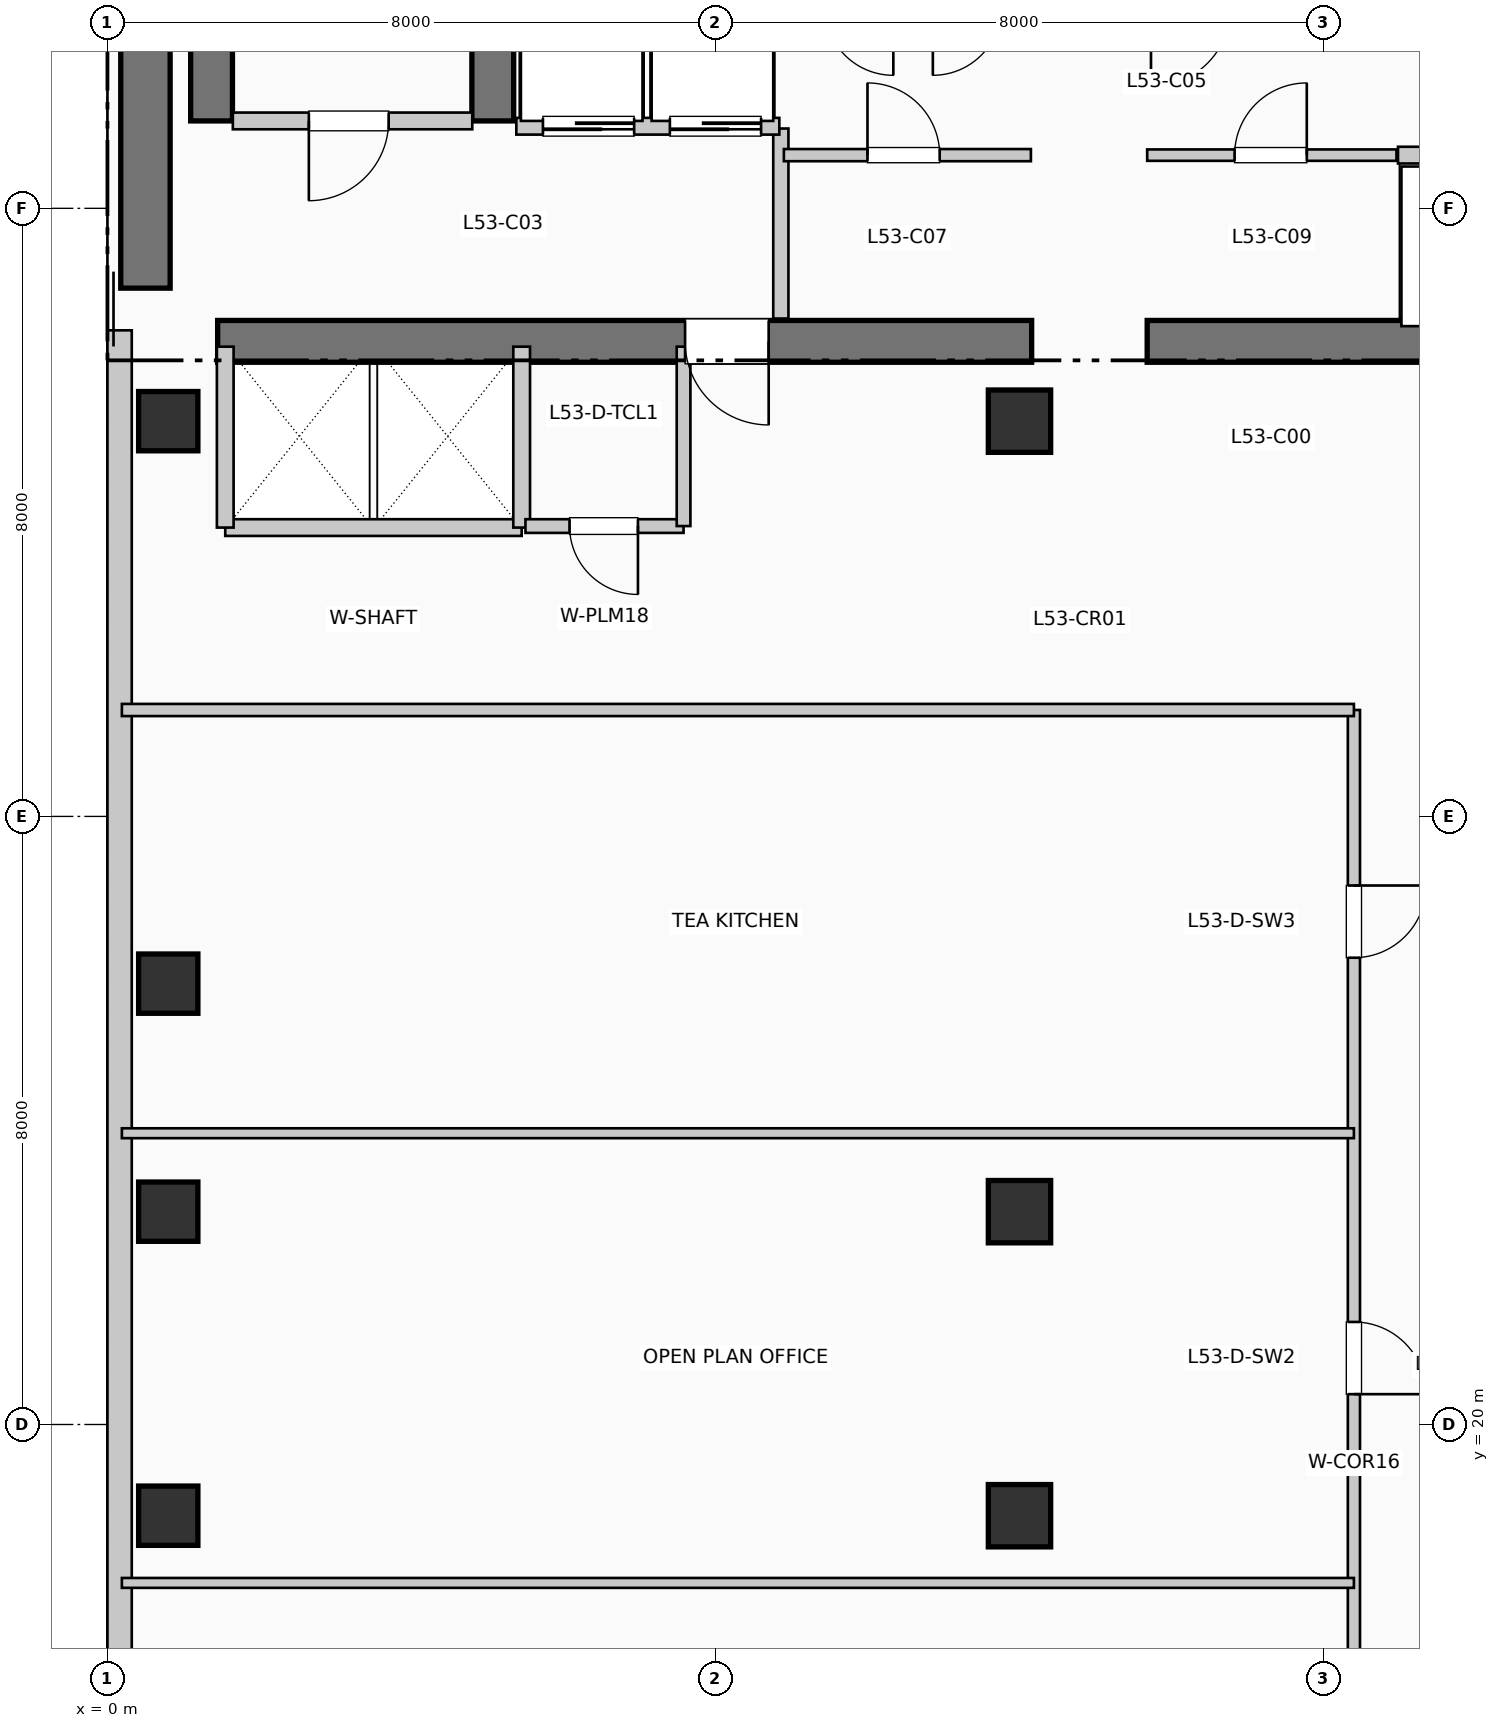
"""IFC4 building model, lengths in metres.
Left out: names, types, materials, properties, quantities, classifications, styles, units other than length and angle.
Written with IfcOpenShell. Run it as: python <this file> out.ifc"""

import sys

from ifc_helpers import new_model, si_unit, direction, frame, frame_2d, origin, origin_2d, place, context, subcontext, project, spatial, rectangle, extrude, element, fill, save


model = new_model("IFC4")
c1 = context("Model", 3, precision=1e-05, world=origin(), true_north=direction((0.0, 1.0)))
c2 = subcontext(c1, "Body", "Model", "MODEL_VIEW")
j1 = project(units=[si_unit("LENGTHUNIT", "METRE"), si_unit("PLANEANGLEUNIT", "RADIAN")], contexts=[c1])
p1 = place(None, origin())
s1 = spatial("IfcSite", under=j1, at=p1, CompositionType="ELEMENT")
p2 = place(p1, origin())
s2 = spatial("IfcBuilding", under=s1, at=p2, CompositionType="ELEMENT")
p3 = place(p2, frame((0.0, 0.0, 219.78)))
s3 = spatial("IfcBuildingStorey", under=s2, at=p3, CompositionType="ELEMENT", Elevation=219.78)
p4 = place(p3, frame((0.5, 34.95, 0.0), z_axis=(0.0, 0.0, 1.0), x_axis=(0.0, 1.0, 0.0)))
e1 = element("IfcWall", 1, at=p4, inside=s3, PredefinedType="SHEAR", context=c2, shape_type="SweptSolid", body=[
    extrude(rectangle(XDim=7.9, YDim=0.65, at=frame_2d((3.95, 0.0))), origin(), (0.0, 0.0, 1.0), 3.96),
])
p5 = place(p3, frame((1.45, 34.25, 0.0), z_axis=(0.0, 0.0, 1.0), x_axis=(1.0, 0.0, 0.0)))
e2 = element("IfcWall", 2, at=p5, inside=s3, PredefinedType="SHEAR", context=c2, shape_type="SweptSolid", body=[
    extrude(rectangle(XDim=10.71, YDim=0.55, at=frame_2d((5.355, 0.0))), origin(), (0.0, 0.0, 1.0), 3.96),
])
p6 = place(p5, frame((7.25, 0.0, 0.0), z_axis=(0.0, 0.0, 1.0), x_axis=(-1.0, 0.0, 0.0)))
e3 = element("IfcOpeningElement", 3, at=p6, cuts=e2, PredefinedType="OPENING", context=c2, shape_type="SweptSolid", body=[
    extrude(rectangle(XDim=1.1, YDim=2.15, at=frame_2d((0.55, 1.075))), frame((0.0, 0.285, 0.0), z_axis=(0.0, -1.0, 0.0), x_axis=(1.0, 0.0, 0.0)), (0.0, 0.0, 1.0), 0.57),
])
p7 = place(p3, frame((13.68, 34.25, 0.0), z_axis=(0.0, 0.0, 1.0), x_axis=(1.0, 0.0, 0.0)))
e4 = element("IfcWall", 4, at=p7, inside=s3, PredefinedType="SHEAR", context=c2, shape_type="SweptSolid", body=[
    extrude(rectangle(XDim=6.12, YDim=0.55, at=frame_2d((3.06, 0.0))), origin(), (0.0, 0.0, 1.0), 3.96),
])
for number, where, z_axis, x_axis in (
    (5, (1.37, 37.15, 0.0), (0.0, 0.0, 1.0), (0.0, 1.0, 0.0)),
    (6, (5.07, 37.15, 0.0), (0.0, 0.0, 1.0), (0.0, 1.0, 0.0)),
):
    element("IfcWall", number, at=place(p3, frame(where, z_axis=z_axis, x_axis=x_axis)), inside=s3, PredefinedType="SHEAR", context=c2, shape_type="SweptSolid", body=[
        extrude(rectangle(XDim=7.89, YDim=0.55, at=frame_2d((3.945, 0.0))), origin(), (0.0, 0.0, 1.0), 3.96),
    ])
for number, where, z_axis, x_axis in (
    (7, (0.8, 18.8, 0.0), (0.0, 0.0, 1.0), (1.0, 0.0, 0.0)),
    (8, (0.8, 22.8, 0.0), (0.0, 0.0, 1.0), (1.0, 0.0, 0.0)),
    (9, (0.8, 25.8, 0.0), (0.0, 0.0, 1.0), (1.0, 0.0, 0.0)),
    (10, (0.8, 33.2, 0.0), (0.0, 0.0, 1.0), (1.0, 0.0, 0.0)),
):
    element("IfcColumn", number, at=place(p3, frame(where, z_axis=z_axis, x_axis=x_axis)), inside=s3, PredefinedType="COLUMN", context=c2, shape_type="SweptSolid", body=[
        extrude(rectangle(XDim=0.78, YDim=0.78, at=origin_2d()), origin(), (0.0, 0.0, 1.0), 3.96),
    ])
for number, where, z_axis, x_axis in (
    (11, (12.0, 18.8, 0.0), (0.0, 0.0, 1.0), (1.0, 0.0, 0.0)),
    (12, (12.0, 22.8, 0.0), (0.0, 0.0, 1.0), (1.0, 0.0, 0.0)),
    (13, (12.0, 33.2, 0.0), (0.0, 0.0, 1.0), (1.0, 0.0, 0.0)),
):
    element("IfcColumn", number, at=place(p3, frame(where, z_axis=z_axis, x_axis=x_axis)), inside=s3, PredefinedType="COLUMN", context=c2, shape_type="SweptSolid", body=[
        extrude(rectangle(XDim=0.82, YDim=0.82, at=origin_2d()), origin(), (0.0, 0.0, 1.0), 3.96),
    ])
p8 = place(p3, frame((0.16, 34.395, 0.0), z_axis=(0.0, 0.0, 1.0), x_axis=(0.0, -1.0, 0.0)))
e14 = element("IfcWall", 14, at=p8, inside=s3, PredefinedType="SOLIDWALL", context=c2, shape_type="SweptSolid", body=[
    extrude(rectangle(XDim=25.54, YDim=0.32, at=frame_2d((12.77, 0.0))), origin(), (0.0, 0.0, 1.0), 3.71),
])
p9 = place(p3, frame((1.65, 37.15, 0.0), z_axis=(0.0, 0.0, 1.0), x_axis=(1.0, 0.0, 0.0)))
e15 = element("IfcWall", 15, at=p9, inside=s3, PredefinedType="PARTITIONING", context=c2, shape_type="SweptSolid", body=[
    extrude(rectangle(XDim=3.15, YDim=0.22, at=frame_2d((1.575, 0.0))), origin(), (0.0, 0.0, 1.0), 3.71),
])
p10 = place(p9, frame((2.05, 0.0, 0.0), z_axis=(0.0, 0.0, 1.0), x_axis=(-1.0, 0.0, 0.0)))
e16 = element("IfcOpeningElement", 16, at=p10, cuts=e15, PredefinedType="OPENING", context=c2, shape_type="SweptSolid", body=[
    extrude(rectangle(XDim=1.05, YDim=2.15, at=frame_2d((0.525, 1.075))), frame((0.0, 0.12, 0.0), z_axis=(0.0, -1.0, 0.0), x_axis=(1.0, 0.0, 0.0)), (0.0, 0.0, 1.0), 0.24),
])
p11 = place(p3, frame((8.86, 34.55, 0.0), z_axis=(0.0, 0.0, 1.0), x_axis=(0.0, 1.0, 0.0)))
e17 = element("IfcWall", 17, at=p11, inside=s3, PredefinedType="PARTITIONING", context=c2, shape_type="SweptSolid", body=[
    extrude(rectangle(XDim=2.5, YDim=0.2, at=frame_2d((1.25, 0.0))), origin(), (0.0, 0.0, 1.0), 3.71),
])
p12 = place(p3, frame((5.38, 37.08, 0.0), z_axis=(0.0, 0.0, 1.0), x_axis=(1.0, 0.0, 0.0)))
e18 = element("IfcWall", 18, at=p12, inside=s3, PredefinedType="PARTITIONING", context=c2, shape_type="SweptSolid", body=[
    extrude(rectangle(XDim=3.46, YDim=0.22, at=frame_2d((1.73, 0.0))), origin(), (0.0, 0.0, 1.0), 3.71),
])
p13 = place(p12, frame((1.55, 0.0, 0.0), z_axis=(0.0, 0.0, 1.0), x_axis=(-1.0, 0.0, 0.0)))
e19 = element("IfcOpeningElement", 19, at=p13, cuts=e18, PredefinedType="OPENING", context=c2, shape_type="SweptSolid", body=[
    extrude(rectangle(XDim=1.2, YDim=2.2, at=frame_2d((0.6, 1.1))), frame((0.0, 0.12, 0.0), z_axis=(0.0, -1.0, 0.0), x_axis=(1.0, 0.0, 0.0)), (0.0, 0.0, 1.0), 0.24),
])
p14 = place(p12, frame((3.22, 0.0, 0.0), z_axis=(0.0, 0.0, 1.0), x_axis=(-1.0, 0.0, 0.0)))
e20 = element("IfcOpeningElement", 20, at=p14, cuts=e18, PredefinedType="OPENING", context=c2, shape_type="SweptSolid", body=[
    extrude(rectangle(XDim=1.2, YDim=2.2, at=frame_2d((0.6, 1.1))), frame((0.0, 0.12, 0.0), z_axis=(0.0, -1.0, 0.0), x_axis=(1.0, 0.0, 0.0)), (0.0, 0.0, 1.0), 0.24),
])
p15 = place(p3, frame((1.55, 31.8, 0.0), z_axis=(0.0, 0.0, 1.0), x_axis=(1.0, 0.0, 0.0)))
e21 = element("IfcWall", 21, at=p15, inside=s3, PredefinedType="PARTITIONING", context=c2, shape_type="SweptSolid", body=[
    extrude(rectangle(XDim=3.9, YDim=0.22, at=frame_2d((1.95, 0.0))), origin(), (0.0, 0.0, 1.0), 3.71),
])
for number, where, z_axis, x_axis in (
    (22, (1.55, 31.8, 0.0), (0.0, 0.0, 1.0), (0.0, 1.0, 0.0)),
    (23, (5.45, 31.8, 0.0), (0.0, 0.0, 1.0), (0.0, 1.0, 0.0)),
):
    element("IfcWall", number, at=place(p3, frame(where, z_axis=z_axis, x_axis=x_axis)), inside=s3, PredefinedType="PARTITIONING", context=c2, shape_type="SweptSolid", body=[
        extrude(rectangle(XDim=2.38, YDim=0.22, at=frame_2d((1.19, 0.0))), origin(), (0.0, 0.0, 1.0), 3.71),
    ])
p16 = place(p3, frame((5.5, 31.82, 0.0), z_axis=(0.0, 0.0, 1.0), x_axis=(1.0, 0.0, 0.0)))
e24 = element("IfcWall", 24, at=p16, inside=s3, PredefinedType="PLUMBINGWALL", context=c2, shape_type="SweptSolid", body=[
    extrude(rectangle(XDim=2.08, YDim=0.18, at=frame_2d((1.04, 0.0))), origin(), (0.0, 0.0, 1.0), 3.71),
])
p17 = place(p16, frame((1.48, 0.0, 0.0), z_axis=(0.0, 0.0, 1.0), x_axis=(-1.0, 0.0, 0.0)))
e25 = element("IfcOpeningElement", 25, at=p17, cuts=e24, PredefinedType="OPENING", context=c2, shape_type="SweptSolid", body=[
    extrude(rectangle(XDim=0.9, YDim=2.1, at=frame_2d((0.45, 1.05))), frame((0.0, 0.1, 0.0), z_axis=(0.0, -1.0, 0.0), x_axis=(1.0, 0.0, 0.0)), (0.0, 0.0, 1.0), 0.2),
])
p18 = place(p3, frame((7.58, 31.82, 0.0), z_axis=(0.0, 0.0, 1.0), x_axis=(0.0, 1.0, 0.0)))
e26 = element("IfcWall", 26, at=p18, inside=s3, PredefinedType="PLUMBINGWALL", context=c2, shape_type="SweptSolid", body=[
    extrude(rectangle(XDim=2.36, YDim=0.18, at=frame_2d((1.18, 0.0))), origin(), (0.0, 0.0, 1.0), 3.71),
])
p19 = place(p3, frame((8.9, 36.7, 0.0), z_axis=(0.0, 0.0, 1.0), x_axis=(1.0, 0.0, 0.0)))
e27 = element("IfcWall", 27, at=p19, inside=s3, PredefinedType="PARTITIONING", context=c2, shape_type="SweptSolid", body=[
    extrude(rectangle(XDim=3.25, YDim=0.16, at=frame_2d((1.625, 0.0))), origin(), (0.0, 0.0, 1.0), 3.71),
])
p20 = place(p19, frame((1.1, 0.0, 0.0)))
e28 = element("IfcOpeningElement", 28, at=p20, cuts=e27, PredefinedType="OPENING", context=c2, shape_type="SweptSolid", body=[
    extrude(rectangle(XDim=0.95, YDim=2.15, at=frame_2d((0.475, 1.075))), frame((0.0, 0.09, 0.0), z_axis=(0.0, -1.0, 0.0), x_axis=(1.0, 0.0, 0.0)), (0.0, 0.0, 1.0), 0.18),
])
p21 = place(p3, frame((13.68, 36.7, 0.0), z_axis=(0.0, 0.0, 1.0), x_axis=(1.0, 0.0, 0.0)))
e29 = element("IfcWall", 29, at=p21, inside=s3, PredefinedType="PARTITIONING", context=c2, shape_type="SweptSolid", body=[
    extrude(rectangle(XDim=3.28, YDim=0.15, at=frame_2d((1.64, 0.0))), origin(), (0.0, 0.0, 1.0), 3.71),
])
p22 = place(p21, frame((1.15, 0.0, 0.0)))
e30 = element("IfcOpeningElement", 30, at=p22, cuts=e29, PredefinedType="OPENING", context=c2, shape_type="SweptSolid", body=[
    extrude(rectangle(XDim=0.95, YDim=2.15, at=frame_2d((0.475, 1.075))), frame((0.0, 0.085, 0.0), z_axis=(0.0, -1.0, 0.0), x_axis=(1.0, 0.0, 0.0)), (0.0, 0.0, 1.0), 0.17),
])
p23 = place(p3, frame((16.98, 36.7, 0.0), z_axis=(0.0, 0.0, 1.0), x_axis=(1.0, 0.0, 0.0)))
e31 = element("IfcWall", 31, at=p23, inside=s3, PredefinedType="PARTITIONING", context=c2, shape_type="SweptSolid", body=[
    extrude(rectangle(XDim=1.7, YDim=0.22, at=frame_2d((0.85, 0.0))), origin(), (0.0, 0.0, 1.0), 3.71),
])
p24 = place(p23, frame((0.3, 0.0, 0.0)))
e32 = element("IfcOpeningElement", 32, at=p24, cuts=e31, PredefinedType="OPENING", context=c2, shape_type="SweptSolid", body=[
    extrude(rectangle(XDim=1.1, YDim=2.2, at=frame_2d((0.55, 1.1))), frame((0.0, 0.12, 0.0), z_axis=(0.0, -1.0, 0.0), x_axis=(1.0, 0.0, 0.0)), (0.0, 0.0, 1.0), 0.24),
])
p25 = place(p3, frame((16.4, 12.0, 0.0), z_axis=(0.0, 0.0, 1.0), x_axis=(0.0, 1.0, 0.0)))
e33 = element("IfcWall", 33, at=p25, inside=s3, PredefinedType="PARTITIONING", context=c2, shape_type="SweptSolid", body=[
    extrude(rectangle(XDim=17.4, YDim=0.16, at=frame_2d((8.7, 0.0))), origin(), (0.0, 0.0, 1.0), 3.71),
])
p26 = place(p25, frame((3.433, 0.0, 0.0), z_axis=(0.0, 0.0, 1.0), x_axis=(-1.0, 0.0, 0.0)))
e34 = element("IfcOpeningElement", 34, at=p26, cuts=e33, PredefinedType="OPENING", context=c2, shape_type="SweptSolid", body=[
    extrude(rectangle(XDim=0.95, YDim=2.15, at=frame_2d((0.475, 1.075))), frame((0.0, 0.09, 0.0), z_axis=(0.0, -1.0, 0.0), x_axis=(1.0, 0.0, 0.0)), (0.0, 0.0, 1.0), 0.18),
])
p27 = place(p25, frame((9.349, 0.0, 0.0), z_axis=(0.0, 0.0, 1.0), x_axis=(-1.0, 0.0, 0.0)))
e35 = element("IfcOpeningElement", 35, at=p27, cuts=e33, PredefinedType="OPENING", context=c2, shape_type="SweptSolid", body=[
    extrude(rectangle(XDim=0.95, YDim=2.15, at=frame_2d((0.475, 1.075))), frame((0.0, 0.09, 0.0), z_axis=(0.0, -1.0, 0.0), x_axis=(1.0, 0.0, 0.0)), (0.0, 0.0, 1.0), 0.18),
])
p28 = place(p25, frame((15.091, 0.0, 0.0), z_axis=(0.0, 0.0, 1.0), x_axis=(-1.0, 0.0, 0.0)))
e36 = element("IfcOpeningElement", 36, at=p28, cuts=e33, PredefinedType="OPENING", context=c2, shape_type="SweptSolid", body=[
    extrude(rectangle(XDim=0.95, YDim=2.15, at=frame_2d((0.475, 1.075))), frame((0.0, 0.09, 0.0), z_axis=(0.0, -1.0, 0.0), x_axis=(1.0, 0.0, 0.0)), (0.0, 0.0, 1.0), 0.18),
])
p29 = place(p3, frame((0.19, 29.4, 0.0), z_axis=(0.0, 0.0, 1.0), x_axis=(1.0, 0.0, 0.0)))
e37 = element("IfcWall", 37, at=p29, inside=s3, PredefinedType="PARTITIONING", context=c2, shape_type="SweptSolid", body=[
    extrude(rectangle(XDim=16.21, YDim=0.16, at=frame_2d((8.105, 0.0))), origin(), (0.0, 0.0, 1.0), 3.365),
])
for number, where, z_axis, x_axis in (
    (38, (0.19, 17.916, 0.0), (0.0, 0.0, 1.0), (1.0, 0.0, 0.0)),
    (39, (0.19, 23.832, 0.0), (0.0, 0.0, 1.0), (1.0, 0.0, 0.0)),
):
    element("IfcWall", number, at=place(p3, frame(where, z_axis=z_axis, x_axis=x_axis)), inside=s3, PredefinedType="PARTITIONING", context=c2, shape_type="SweptSolid", body=[
        extrude(rectangle(XDim=16.21, YDim=0.13, at=frame_2d((8.105, 0.0))), origin(), (0.0, 0.0, 1.0), 3.71),
    ])
p30 = place(p10, origin())
e40 = element("IfcDoor", 40, at=p30, inside=s3, OperationType="SINGLE_SWING_LEFT", PredefinedType="DOOR", context=c2, shape_type="SweptSolid", body=[
    extrude(rectangle(XDim=1.05, YDim=2.15, at=frame_2d((0.525, 1.075))), frame((0.0, 0.025, 0.0), z_axis=(0.0, -1.0, 0.0), x_axis=(1.0, 0.0, 0.0)), (0.0, 0.0, 1.0), 0.05),
])
fill(e16, e40)
p31 = place(p6, origin())
e41 = element("IfcDoor", 41, at=p31, inside=s3, OperationType="SINGLE_SWING_RIGHT", PredefinedType="DOOR", context=c2, shape_type="SweptSolid", body=[
    extrude(rectangle(XDim=1.1, YDim=2.15, at=frame_2d((0.55, 1.075))), frame((0.0, 0.025, 0.0), z_axis=(0.0, -1.0, 0.0), x_axis=(1.0, 0.0, 0.0)), (0.0, 0.0, 1.0), 0.05),
])
fill(e3, e41)
p32 = place(p13, origin())
e42 = element("IfcDoor", 42, at=p32, inside=s3, OperationType="SLIDING_TO_RIGHT", PredefinedType="DOOR", context=c2, shape_type="SweptSolid", body=[
    extrude(rectangle(XDim=1.2, YDim=2.2, at=frame_2d((0.6, 1.1))), frame((0.0, 0.025, 0.0), z_axis=(0.0, -1.0, 0.0), x_axis=(1.0, 0.0, 0.0)), (0.0, 0.0, 1.0), 0.05),
])
fill(e19, e42)
p33 = place(p14, origin())
e43 = element("IfcDoor", 43, at=p33, inside=s3, OperationType="SLIDING_TO_RIGHT", PredefinedType="DOOR", context=c2, shape_type="SweptSolid", body=[
    extrude(rectangle(XDim=1.2, YDim=2.2, at=frame_2d((0.6, 1.1))), frame((0.0, 0.025, 0.0), z_axis=(0.0, -1.0, 0.0), x_axis=(1.0, 0.0, 0.0)), (0.0, 0.0, 1.0), 0.05),
])
fill(e20, e43)
p34 = place(p17, origin())
e44 = element("IfcDoor", 44, at=p34, inside=s3, OperationType="SINGLE_SWING_RIGHT", PredefinedType="DOOR", context=c2, shape_type="SweptSolid", body=[
    extrude(rectangle(XDim=0.9, YDim=2.1, at=frame_2d((0.45, 1.05))), frame((0.0, 0.025, 0.0), z_axis=(0.0, -1.0, 0.0), x_axis=(1.0, 0.0, 0.0)), (0.0, 0.0, 1.0), 0.05),
])
fill(e25, e44)
p35 = place(p20, origin())
e45 = element("IfcDoor", 45, at=p35, inside=s3, OperationType="SINGLE_SWING_LEFT", PredefinedType="DOOR", context=c2, shape_type="SweptSolid", body=[
    extrude(rectangle(XDim=0.95, YDim=2.15, at=frame_2d((0.475, 1.075))), frame((0.0, 0.025, 0.0), z_axis=(0.0, -1.0, 0.0), x_axis=(1.0, 0.0, 0.0)), (0.0, 0.0, 1.0), 0.05),
])
fill(e28, e45)
p36 = place(p22, origin())
e46 = element("IfcDoor", 46, at=p36, inside=s3, OperationType="SINGLE_SWING_RIGHT", PredefinedType="DOOR", context=c2, shape_type="SweptSolid", body=[
    extrude(rectangle(XDim=0.95, YDim=2.15, at=frame_2d((0.475, 1.075))), frame((0.0, 0.025, 0.0), z_axis=(0.0, -1.0, 0.0), x_axis=(1.0, 0.0, 0.0)), (0.0, 0.0, 1.0), 0.05),
])
fill(e30, e46)
p37 = place(p27, origin())
e47 = element("IfcDoor", 47, at=p37, inside=s3, OperationType="SINGLE_SWING_LEFT", PredefinedType="DOOR", context=c2, shape_type="SweptSolid", body=[
    extrude(rectangle(XDim=0.95, YDim=2.15, at=frame_2d((0.475, 1.075))), frame((0.0, 0.025, 0.0), z_axis=(0.0, -1.0, 0.0), x_axis=(1.0, 0.0, 0.0)), (0.0, 0.0, 1.0), 0.05),
])
fill(e35, e47)
p38 = place(p28, origin())
e48 = element("IfcDoor", 48, at=p38, inside=s3, OperationType="SINGLE_SWING_RIGHT", PredefinedType="DOOR", context=c2, shape_type="SweptSolid", body=[
    extrude(rectangle(XDim=0.95, YDim=2.15, at=frame_2d((0.475, 1.075))), frame((0.0, 0.025, 0.0), z_axis=(0.0, -1.0, 0.0), x_axis=(1.0, 0.0, 0.0)), (0.0, 0.0, 1.0), 0.05),
])
fill(e36, e48)
save(model, sys.argv[1])
